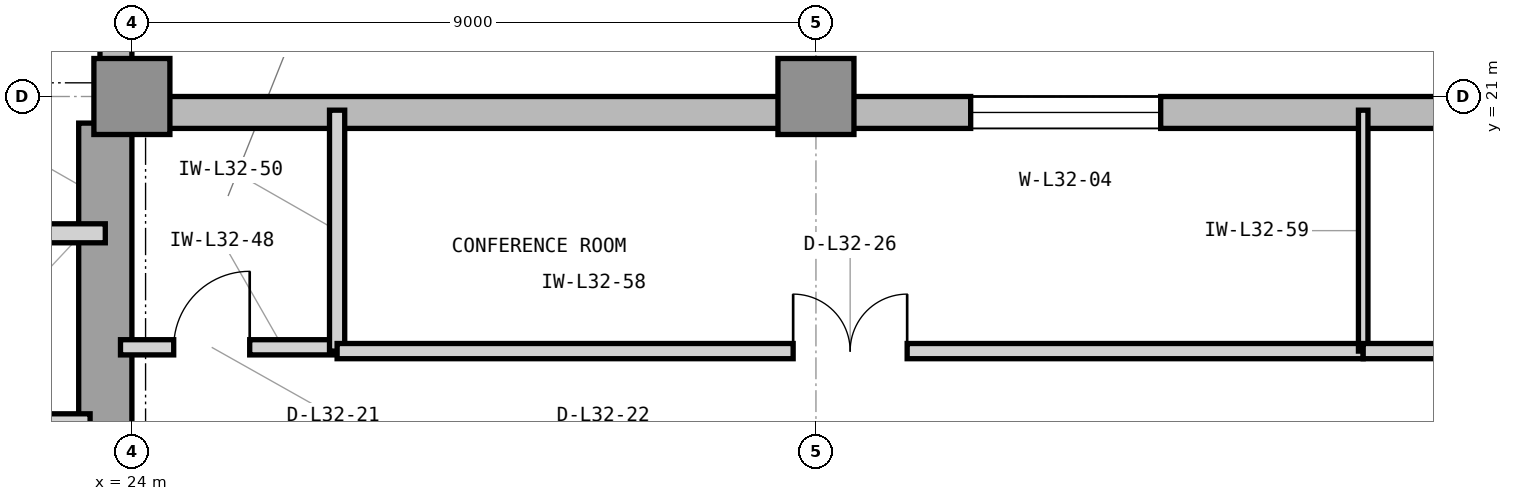
"""IFC4 building model, lengths in metres.
Left out: names, types, materials, properties, quantities, classifications, styles, units other than length and angle.
Written with IfcOpenShell. Run it as: python <this file> out.ifc"""

import sys

from ifc_helpers import new_model, si_unit, direction, frame, frame_2d, origin, origin_2d, place, context, subcontext, project, spatial, rectangle, extrude, element, fill, save


model = new_model("IFC4")
c1 = context("Model", 3, precision=1e-05, world=origin(), true_north=direction((0.0, 1.0)))
c2 = subcontext(c1, "Body", "Model", "MODEL_VIEW")
j1 = project(units=[si_unit("LENGTHUNIT", "METRE"), si_unit("PLANEANGLEUNIT", "RADIAN")], contexts=[c1])
p1 = place(None, origin())
s1 = spatial("IfcSite", under=j1, at=p1, CompositionType="ELEMENT")
p2 = place(p1, origin())
s2 = spatial("IfcBuilding", under=s1, at=p2, CompositionType="ELEMENT")
p3 = place(p2, frame((0.0, 0.0, 136.2)))
s3 = spatial("IfcBuildingStorey", under=s2, at=p3, CompositionType="ELEMENT", Elevation=136.2)
p4 = place(p3, frame((23.65, 16.6, 0.0), z_axis=(0.0, 0.0, 1.0), x_axis=(0.0, 1.0, 0.0)))
e1 = element("IfcWall", 1, at=p4, inside=s3, PredefinedType="SHEAR", context=c2, shape_type="SweptSolid", body=[
    extrude(rectangle(XDim=4.05, YDim=0.7, at=frame_2d((2.025, 0.0))), origin(), (0.0, 0.0, 1.0), 3.9),
])
for number, where, z_axis, x_axis in (
    (2, (24.0, 21.0, 0.0), (0.0, 0.0, 1.0), (1.0, 0.0, 0.0)),
    (3, (33.0, 21.0, 0.0), (0.0, 0.0, 1.0), (1.0, 0.0, 0.0)),
):
    element("IfcColumn", number, at=place(p3, frame(where, z_axis=z_axis, x_axis=x_axis)), inside=s3, PredefinedType="COLUMN", context=c2, shape_type="SweptSolid", body=[
        extrude(rectangle(XDim=1.0, YDim=1.0, at=origin_2d()), origin(), (0.0, 0.0, 1.0), 3.9),
    ])
p5 = place(p3, frame((58.4, 20.79, 0.0), z_axis=(0.0, 0.0, 1.0), x_axis=(-1.0, 0.0, 0.0)))
e4 = element("IfcWall", 4, at=p5, inside=s3, PredefinedType="STANDARD", context=c2, shape_type="SweptSolid", body=[
    extrude(rectangle(XDim=34.4, YDim=0.42, at=frame_2d((17.2, 0.0))), origin(), (0.0, 0.0, 1.0), 3.7),
])
p6 = place(p5, frame((20.864, 0.0, 0.85)))
e5 = element("IfcOpeningElement", 5, at=p6, cuts=e4, PredefinedType="OPENING", context=c2, shape_type="SweptSolid", body=[
    extrude(rectangle(XDim=2.5, YDim=2.25, at=frame_2d((1.25, 1.125))), frame((0.0, 0.22, 0.0), z_axis=(0.0, -1.0, 0.0), x_axis=(1.0, 0.0, 0.0)), (0.0, 0.0, 1.0), 0.44),
])
p7 = place(p5, frame((11.386, 0.0, 0.85)))
e6 = element("IfcOpeningElement", 6, at=p7, cuts=e4, PredefinedType="OPENING", context=c2, shape_type="SweptSolid", body=[
    extrude(rectangle(XDim=2.5, YDim=2.25, at=frame_2d((1.25, 1.125))), frame((0.0, 0.22, 0.0), z_axis=(0.0, -1.0, 0.0), x_axis=(1.0, 0.0, 0.0)), (0.0, 0.0, 1.0), 0.44),
])
p8 = place(p3, frame((23.79, 21.0, 0.0), z_axis=(0.0, 0.0, 1.0), x_axis=(0.0, 1.0, 0.0)))
e7 = element("IfcWall", 7, at=p8, inside=s3, PredefinedType="STANDARD", context=c2, shape_type="SweptSolid", body=[
    extrude(rectangle(XDim=25.4, YDim=0.42, at=frame_2d((12.7, 0.0))), origin(), (0.0, 0.0, 1.0), 3.7),
])
p9 = place(p8, frame((11.45, 0.0, 0.85)))
e8 = element("IfcOpeningElement", 8, at=p9, cuts=e7, PredefinedType="OPENING", context=c2, shape_type="SweptSolid", body=[
    extrude(rectangle(XDim=2.5, YDim=2.25, at=frame_2d((1.25, 1.125))), frame((0.0, 0.22, 0.0), z_axis=(0.0, -1.0, 0.0), x_axis=(1.0, 0.0, 0.0)), (0.0, 0.0, 1.0), 0.44),
])
p10 = place(p3, frame((21.05, 16.7, 0.0), z_axis=(0.0, 0.0, 1.0), x_axis=(1.0, 0.0, 0.0)))
e9 = element("IfcWall", 9, at=p10, inside=s3, PredefinedType="PARTITIONING", context=c2, shape_type="SweptSolid", body=[
    extrude(rectangle(XDim=2.4, YDim=0.25, at=frame_2d((1.2, 0.0))), origin(), (0.0, 0.0, 1.0), 3.233),
])
p11 = place(p3, frame((16.45, 19.2, 0.0), z_axis=(0.0, 0.0, 1.0), x_axis=(1.0, 0.0, 0.0)))
e10 = element("IfcWall", 10, at=p11, inside=s3, PredefinedType="PARTITIONING", context=c2, shape_type="SweptSolid", body=[
    extrude(rectangle(XDim=7.2, YDim=0.25, at=frame_2d((3.6, 0.0))), origin(), (0.0, 0.0, 1.0), 3.69),
])
p12 = place(p3, frame((23.85, 17.7, 0.0), z_axis=(0.0, 0.0, 1.0), x_axis=(1.0, 0.0, 0.0)))
e11 = element("IfcWall", 11, at=p12, inside=s3, PredefinedType="PARTITIONING", context=c2, shape_type="SweptSolid", body=[
    extrude(rectangle(XDim=2.85, YDim=0.2, at=frame_2d((1.425, 0.0))), origin(), (0.0, 0.0, 1.0), 3.69),
])
p13 = place(p12, frame((0.7, 0.0, 0.0)))
e12 = element("IfcOpeningElement", 12, at=p13, cuts=e11, PredefinedType="OPENING", context=c2, shape_type="SweptSolid", body=[
    extrude(rectangle(XDim=1.0, YDim=2.15, at=frame_2d((0.5, 1.075))), frame((0.0, 0.11, 0.0), z_axis=(0.0, -1.0, 0.0), x_axis=(1.0, 0.0, 0.0)), (0.0, 0.0, 1.0), 0.22),
])
p14 = place(p3, frame((26.7, 17.65, 0.0), z_axis=(0.0, 0.0, 1.0), x_axis=(0.0, 1.0, 0.0)))
e13 = element("IfcWall", 13, at=p14, inside=s3, PredefinedType="PARTITIONING", context=c2, shape_type="SweptSolid", body=[
    extrude(rectangle(XDim=3.17, YDim=0.2, at=frame_2d((1.585, 0.0))), origin(), (0.0, 0.0, 1.0), 3.69),
])
p15 = place(p3, frame((26.7, 17.65, 0.0), z_axis=(0.0, 0.0, 1.0), x_axis=(1.0, 0.0, 0.0)))
e14 = element("IfcWall", 14, at=p15, inside=s3, PredefinedType="PARTITIONING", context=c2, shape_type="SweptSolid", body=[
    extrude(rectangle(XDim=13.5, YDim=0.2, at=frame_2d((6.75, 0.0))), origin(), (0.0, 0.0, 1.0), 3.69),
])
p16 = place(p15, frame((6.0, 0.0, 0.0)))
e15 = element("IfcOpeningElement", 15, at=p16, cuts=e14, PredefinedType="OPENING", context=c2, shape_type="SweptSolid", body=[
    extrude(rectangle(XDim=1.5, YDim=2.3, at=frame_2d((0.75, 1.15))), frame((0.0, 0.11, 0.0), z_axis=(0.0, -1.0, 0.0), x_axis=(1.0, 0.0, 0.0)), (0.0, 0.0, 1.0), 0.22),
])
p17 = place(p3, frame((40.2, 17.65, 0.0), z_axis=(0.0, 0.0, 1.0), x_axis=(0.0, 1.0, 0.0)))
e16 = element("IfcWall", 16, at=p17, inside=s3, PredefinedType="PARTITIONING", context=c2, shape_type="SweptSolid", body=[
    extrude(rectangle(XDim=3.17, YDim=0.125, at=frame_2d((1.585, 0.0))), origin(), (0.0, 0.0, 1.0), 3.69),
])
p18 = place(p3, frame((40.2, 17.65, 0.0), z_axis=(0.0, 0.0, 1.0), x_axis=(1.0, 0.0, 0.0)))
e17 = element("IfcWall", 17, at=p18, inside=s3, PredefinedType="PARTITIONING", context=c2, shape_type="SweptSolid", body=[
    extrude(rectangle(XDim=12.8, YDim=0.2, at=frame_2d((6.4, 0.0))), origin(), (0.0, 0.0, 1.0), 3.69),
])
p19 = place(p18, frame((5.9, 0.0, 0.0)))
e18 = element("IfcOpeningElement", 18, at=p19, cuts=e17, PredefinedType="OPENING", context=c2, shape_type="SweptSolid", body=[
    extrude(rectangle(XDim=1.0, YDim=2.15, at=frame_2d((0.5, 1.075))), frame((0.0, 0.11, 0.0), z_axis=(0.0, -1.0, 0.0), x_axis=(1.0, 0.0, 0.0)), (0.0, 0.0, 1.0), 0.22),
])
p20 = place(p6, origin())
e19 = element("IfcWindow", 19, at=p20, inside=s3, PartitioningType="SINGLE_PANEL", PredefinedType="WINDOW", context=c2, shape_type="SweptSolid", body=[
    extrude(rectangle(XDim=2.5, YDim=2.25, at=frame_2d((1.25, 1.125))), frame((0.0, 0.11, 0.0), z_axis=(0.0, -1.0, 0.0), x_axis=(1.0, 0.0, 0.0)), (0.0, 0.0, 1.0), 0.06),
])
fill(e5, e19)
p21 = place(p13, origin())
e20 = element("IfcDoor", 20, at=p21, inside=s3, OperationType="SINGLE_SWING_RIGHT", PredefinedType="DOOR", context=c2, shape_type="SweptSolid", body=[
    extrude(rectangle(XDim=1.0, YDim=2.15, at=frame_2d((0.5, 1.075))), frame((0.0, 0.025, 0.0), z_axis=(0.0, -1.0, 0.0), x_axis=(1.0, 0.0, 0.0)), (0.0, 0.0, 1.0), 0.05),
])
fill(e12, e20)
p22 = place(p16, origin())
e21 = element("IfcDoor", 21, at=p22, inside=s3, OperationType="DOUBLE_DOOR_SINGLE_SWING", PredefinedType="DOOR", context=c2, shape_type="SweptSolid", body=[
    extrude(rectangle(XDim=1.5, YDim=2.3, at=frame_2d((0.75, 1.15))), frame((0.0, 0.025, 0.0), z_axis=(0.0, -1.0, 0.0), x_axis=(1.0, 0.0, 0.0)), (0.0, 0.0, 1.0), 0.05),
])
fill(e15, e21)
save(model, sys.argv[1])
